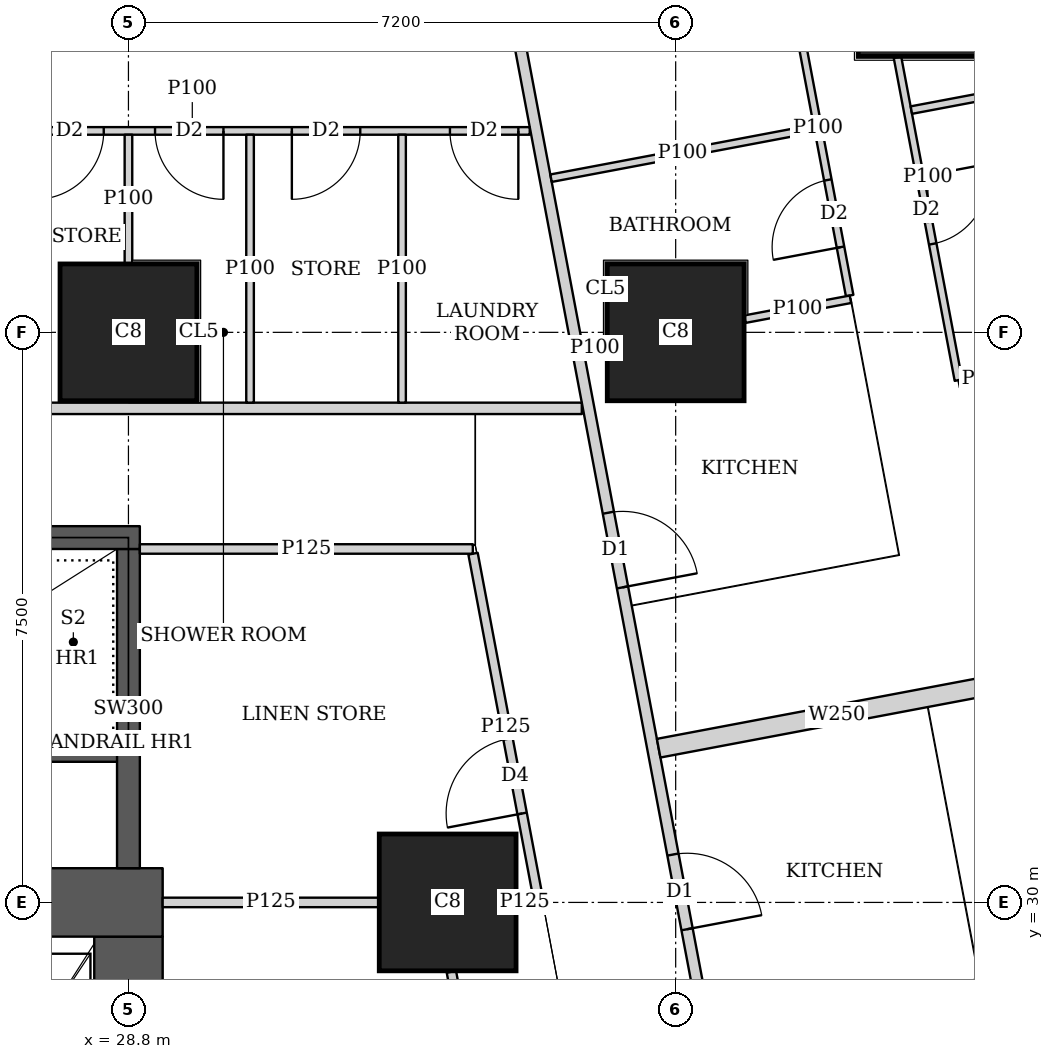
"""IFC4 building model, lengths in metres.
Left out: names, types, materials, properties, quantities, classifications, styles, units other than length and angle.
Written with IfcOpenShell. Run it as: python <this file> out.ifc"""

import sys

from ifc_helpers import new_model, si_unit, direction, frame, frame_2d, origin, origin_2d, place, context, subcontext, project, spatial, rectangle, extrude, element, fill, save


model = new_model("IFC4")
c1 = context("Model", 3, precision=1e-05, world=origin(), true_north=direction((0.0, 1.0)))
c2 = subcontext(c1, "Body", "Model", "MODEL_VIEW")
j1 = project(units=[si_unit("LENGTHUNIT", "METRE"), si_unit("PLANEANGLEUNIT", "RADIAN")], contexts=[c1])
p1 = place(None, origin())
s1 = spatial("IfcSite", under=j1, at=p1, CompositionType="ELEMENT")
p2 = place(p1, origin())
s2 = spatial("IfcBuilding", under=s1, at=p2, CompositionType="ELEMENT")
p3 = place(p2, frame((0.0, 0.0, 23.75)))
s3 = spatial("IfcBuildingStorey", under=s2, at=p3, CompositionType="ELEMENT", Elevation=23.75)
for number, where, z_axis, x_axis in (
    (1, (33.0, 30.0, 0.0), (0.0, 0.0, 1.0), (1.0, 0.0, 0.0)),
    (2, (28.8, 37.5, 0.0), (0.0, 0.0, 1.0), (1.0, 0.0, 0.0)),
    (3, (36.0, 37.5, 0.0), (0.0, 0.0, 1.0), (1.0, 0.0, 0.0)),
):
    element("IfcColumn", number, at=place(p3, frame(where, z_axis=z_axis, x_axis=x_axis)), inside=s3, PredefinedType="COLUMN", context=c2, shape_type="SweptSolid", body=[
        extrude(rectangle(XDim=1.8, YDim=1.8, at=origin_2d()), origin(), (0.0, 0.0, 1.0), 3.75),
    ])
p4 = place(p3, frame((40.102, 42.83, 0.0), z_axis=(0.0, 0.0, 1.0), x_axis=(1.0, 0.0, 0.0)))
e4 = element("IfcColumn", 4, at=p4, inside=s3, PredefinedType="COLUMN", context=c2, shape_type="SweptSolid", body=[
    extrude(rectangle(XDim=3.4, YDim=3.4, at=origin_2d()), origin(), (0.0, 0.0, 1.0), 3.75),
])
p5 = place(p3, frame((13.95, 30.0, 0.0), z_axis=(0.0, 0.0, 1.0), x_axis=(1.0, 0.0, 0.0)))
e5 = element("IfcWall", 5, at=p5, inside=s3, PredefinedType="SHEAR", context=c2, shape_type="SweptSolid", body=[
    extrude(rectangle(XDim=15.3, YDim=0.9, at=frame_2d((7.65, 0.0))), origin(), (0.0, 0.0, 1.0), 3.75),
])
p6 = place(p5, frame((4.45, 0.0, 0.0)))
e6 = element("IfcOpeningElement", 6, at=p6, cuts=e5, PredefinedType="OPENING", context=c2, shape_type="SweptSolid", body=[
    extrude(rectangle(XDim=1.8, YDim=2.1, at=frame_2d((0.9, 1.05))), frame((0.0, 0.46, 0.0), z_axis=(0.0, -1.0, 0.0), x_axis=(1.0, 0.0, 0.0)), (0.0, 0.0, 1.0), 0.92),
])
p7 = place(p5, frame((10.7, 0.0, 0.0)))
e7 = element("IfcOpeningElement", 7, at=p7, cuts=e5, PredefinedType="OPENING", context=c2, shape_type="SweptSolid", body=[
    extrude(rectangle(XDim=1.1, YDim=2.1, at=frame_2d((0.55, 1.05))), frame((0.0, 0.46, 0.0), z_axis=(0.0, -1.0, 0.0), x_axis=(1.0, 0.0, 0.0)), (0.0, 0.0, 1.0), 0.92),
])
p8 = place(p3, frame((28.8, 15.45, 0.0), z_axis=(0.0, 0.0, 1.0), x_axis=(0.0, 1.0, 0.0)))
e8 = element("IfcWall", 8, at=p8, inside=s3, PredefinedType="SHEAR", context=c2, shape_type="SweptSolid", body=[
    extrude(rectangle(XDim=14.1, YDim=0.9, at=frame_2d((7.05, 0.0))), origin(), (0.0, 0.0, 1.0), 3.75),
])
p9 = place(p3, frame((21.45, 34.8, 0.0), z_axis=(0.0, 0.0, 1.0), x_axis=(1.0, 0.0, 0.0)))
e9 = element("IfcWall", 9, at=p9, inside=s3, PredefinedType="SHEAR", context=c2, shape_type="SweptSolid", body=[
    extrude(rectangle(XDim=7.5, YDim=0.3, at=frame_2d((3.75, 0.0))), origin(), (0.0, 0.0, 1.0), 3.75),
])
p10 = place(p9, frame((0.5, 0.0, 0.0)))
e10 = element("IfcOpeningElement", 10, at=p10, cuts=e9, PredefinedType="OPENING", context=c2, shape_type="SweptSolid", body=[
    extrude(rectangle(XDim=1.1, YDim=2.1, at=frame_2d((0.55, 1.05))), frame((0.0, 0.16, 0.0), z_axis=(0.0, -1.0, 0.0), x_axis=(1.0, 0.0, 0.0)), (0.0, 0.0, 1.0), 0.32),
])
p11 = place(p3, frame((28.8, 30.45, 0.0), z_axis=(0.0, 0.0, 1.0), x_axis=(0.0, 1.0, 0.0)))
e11 = element("IfcWall", 11, at=p11, inside=s3, PredefinedType="SHEAR", context=c2, shape_type="SweptSolid", body=[
    extrude(rectangle(XDim=4.2, YDim=0.3, at=frame_2d((2.1, 0.0))), origin(), (0.0, 0.0, 1.0), 3.75),
])
p12 = place(p3, frame((8.35, 36.5, 0.0), z_axis=(0.0, 0.0, 1.0), x_axis=(1.0, 0.0, 0.0)))
e12 = element("IfcWall", 12, at=p12, inside=s3, PredefinedType="SOLIDWALL", context=c2, shape_type="SweptSolid", body=[
    extrude(rectangle(XDim=26.415, YDim=0.15, at=frame_2d((13.208, 0.0))), origin(), (0.0, 0.0, 1.0), 3.5),
])
p13 = place(p12, frame((3.383, 0.0, 0.0)))
e13 = element("IfcOpeningElement", 13, at=p13, cuts=e12, PredefinedType="OPENING", context=c2, shape_type="SweptSolid", body=[
    extrude(rectangle(XDim=1.0, YDim=2.1, at=frame_2d((0.5, 1.05))), frame((0.0, 0.085, 0.0), z_axis=(0.0, -1.0, 0.0), x_axis=(1.0, 0.0, 0.0)), (0.0, 0.0, 1.0), 0.17),
])
p14 = place(p12, frame((7.65, 0.0, 0.0)))
e14 = element("IfcOpeningElement", 14, at=p14, cuts=e12, PredefinedType="OPENING", context=c2, shape_type="SweptSolid", body=[
    extrude(rectangle(XDim=1.0, YDim=2.1, at=frame_2d((0.5, 1.05))), frame((0.0, 0.085, 0.0), z_axis=(0.0, -1.0, 0.0), x_axis=(1.0, 0.0, 0.0)), (0.0, 0.0, 1.0), 0.17),
])
p15 = place(p12, frame((14.857, 0.0, 0.0)))
e15 = element("IfcOpeningElement", 15, at=p15, cuts=e12, PredefinedType="OPENING", context=c2, shape_type="SweptSolid", body=[
    extrude(rectangle(XDim=1.0, YDim=2.1, at=frame_2d((0.5, 1.05))), frame((0.0, 0.085, 0.0), z_axis=(0.0, -1.0, 0.0), x_axis=(1.0, 0.0, 0.0)), (0.0, 0.0, 1.0), 0.17),
])
p16 = place(p3, frame((33.755, 42.325, 0.0), z_axis=(0.0, 0.0, 1.0), x_axis=(0.185611461091, -0.982623216453, 0.0)))
e16 = element("IfcWall", 16, at=p16, inside=s3, PredefinedType="SOLIDWALL", context=c2, shape_type="SweptSolid", body=[
    extrude(rectangle(XDim=40.241, YDim=0.15, at=frame_2d((20.121, 0.0))), origin(), (0.0, 0.0, 1.0), 2.5),
])
p17 = place(p16, frame((7.325, 0.0, 0.0)))
e17 = element("IfcOpeningElement", 17, at=p17, cuts=e16, PredefinedType="OPENING", context=c2, shape_type="SweptSolid", body=[
    extrude(rectangle(XDim=1.0, YDim=2.1, at=frame_2d((0.5, 1.05))), frame((0.0, 0.085, 0.0), z_axis=(0.0, -1.0, 0.0), x_axis=(1.0, 0.0, 0.0)), (0.0, 0.0, 1.0), 0.17),
])
p18 = place(p16, frame((11.902, 0.0, 0.0)))
e18 = element("IfcOpeningElement", 18, at=p18, cuts=e16, PredefinedType="OPENING", context=c2, shape_type="SweptSolid", body=[
    extrude(rectangle(XDim=1.0, YDim=2.1, at=frame_2d((0.5, 1.05))), frame((0.0, 0.085, 0.0), z_axis=(0.0, -1.0, 0.0), x_axis=(1.0, 0.0, 0.0)), (0.0, 0.0, 1.0), 0.17),
])
p19 = place(p16, frame((25.718, 0.0, 0.0)))
e19 = element("IfcOpeningElement", 19, at=p19, cuts=e16, PredefinedType="OPENING", context=c2, shape_type="SweptSolid", body=[
    extrude(rectangle(XDim=1.0, YDim=2.1, at=frame_2d((0.5, 1.05))), frame((0.0, 0.085, 0.0), z_axis=(0.0, -1.0, 0.0), x_axis=(1.0, 0.0, 0.0)), (0.0, 0.0, 1.0), 0.17),
])
p20 = place(p16, frame((31.788, 0.0, 0.0)))
e20 = element("IfcOpeningElement", 20, at=p20, cuts=e16, PredefinedType="OPENING", context=c2, shape_type="SweptSolid", body=[
    extrude(rectangle(XDim=1.0, YDim=2.1, at=frame_2d((0.5, 1.05))), frame((0.0, 0.085, 0.0), z_axis=(0.0, -1.0, 0.0), x_axis=(1.0, 0.0, 0.0)), (0.0, 0.0, 1.0), 0.17),
])
p21 = place(p3, frame((38.918, 41.12, 0.0), z_axis=(0.0, 0.0, 1.0), x_axis=(0.185474723155, -0.982649035552, 0.0)))
e21 = element("IfcWall", 21, at=p21, inside=s3, PredefinedType="PARTITIONING", context=c2, shape_type="SweptSolid", body=[
    extrude(rectangle(XDim=4.324, YDim=0.1, at=frame_2d((2.162, 0.0))), origin(), (0.0, 0.0, 1.0), 3.5),
])
p22 = place(p21, frame((1.6, 0.0, 0.0)))
e22 = element("IfcOpeningElement", 22, at=p22, cuts=e21, PredefinedType="OPENING", context=c2, shape_type="SweptSolid", body=[
    extrude(rectangle(XDim=0.9, YDim=2.1, at=frame_2d((0.45, 1.05))), frame((0.0, 0.06, 0.0), z_axis=(0.0, -1.0, 0.0), x_axis=(1.0, 0.0, 0.0)), (0.0, 0.0, 1.0), 0.12),
])
p23 = place(p3, frame((37.457, 42.39, 0.0), z_axis=(0.0, 0.0, 1.0), x_axis=(0.185560627322, -0.982632817276, 0.0)))
e23 = element("IfcWall", 23, at=p23, inside=s3, PredefinedType="PARTITIONING", context=c2, shape_type="SweptSolid", body=[
    extrude(rectangle(XDim=4.484, YDim=0.1, at=frame_2d((2.242, 0.0))), origin(), (0.0, 0.0, 1.0), 3.5),
])
p24 = place(p23, frame((2.936, 0.0, 0.0)))
e24 = element("IfcOpeningElement", 24, at=p24, cuts=e23, PredefinedType="OPENING", context=c2, shape_type="SweptSolid", body=[
    extrude(rectangle(XDim=0.9, YDim=2.1, at=frame_2d((0.45, 1.05))), frame((0.0, 0.06, 0.0), z_axis=(0.0, -1.0, 0.0), x_axis=(1.0, 0.0, 0.0)), (0.0, 0.0, 1.0), 0.12),
])
p25 = place(p3, frame((43.277, 41.212, 0.0), z_axis=(0.0, 0.0, 1.0), x_axis=(-0.982665405803, -0.185387972203, 0.0)))
e25 = element("IfcWall", 25, at=p25, inside=s3, PredefinedType="PARTITIONING", context=c2, shape_type="SweptSolid", body=[
    extrude(rectangle(XDim=4.25, YDim=0.1, at=frame_2d((2.125, 0.0))), origin(), (0.0, 0.0, 1.0), 2.1),
])
p26 = place(p3, frame((40.454, 36.959, 0.0), z_axis=(0.0, 0.0, 1.0), x_axis=(-0.982578421631, -0.185848447247, 0.0)))
e26 = element("IfcWall", 26, at=p26, inside=s3, PredefinedType="PARTITIONING", context=c2, shape_type="SweptSolid", body=[
    extrude(rectangle(XDim=0.737, YDim=0.1, at=frame_2d((0.369, 0.0))), origin(), (0.0, 0.0, 1.0), 3.5),
])
p27 = place(p3, frame((37.823, 40.182, 0.0), z_axis=(0.0, 0.0, 1.0), x_axis=(-0.98263926043, -0.185526504472, 0.0)))
e27 = element("IfcWall", 27, at=p27, inside=s3, PredefinedType="PARTITIONING", context=c2, shape_type="SweptSolid", body=[
    extrude(rectangle(XDim=3.524, YDim=0.1, at=frame_2d((1.762, 0.0))), origin(), (0.0, 0.0, 1.0), 3.5),
])
p28 = place(p3, frame((38.299, 37.935, 0.0), z_axis=(0.0, 0.0, 1.0), x_axis=(-0.982680053146, -0.185310315822, 0.0)))
e28 = element("IfcWall", 28, at=p28, inside=s3, PredefinedType="PARTITIONING", context=c2, shape_type="SweptSolid", body=[
    extrude(rectangle(XDim=1.414, YDim=0.1, at=frame_2d((0.707, 0.0))), origin(), (0.0, 0.0, 1.0), 3.5),
])
p29 = place(p3, frame((35.09, 37.328, 0.0), z_axis=(0.0, 0.0, 1.0), x_axis=(-0.982961380226, -0.183812200315, 0.0)))
e29 = element("IfcWall", 29, at=p29, inside=s3, PredefinedType="PARTITIONING", context=c2, shape_type="SweptSolid", body=[
    extrude(rectangle(XDim=0.31, YDim=0.1, at=frame_2d((0.155, 0.0))), origin(), (0.0, 0.0, 1.0), 3.5),
])
p30 = place(p3, frame((40.468, 32.915, 0.0), z_axis=(0.0, 0.0, 1.0), x_axis=(-0.982635807605, -0.185544791394, 0.0)))
e30 = element("IfcWall", 30, at=p30, inside=s3, PredefinedType="SOLIDWALL", context=c2, shape_type="SweptSolid", body=[
    extrude(rectangle(XDim=4.775, YDim=0.25, at=frame_2d((2.388, 0.0))), origin(), (0.0, 0.0, 1.0), 3.5),
])
p31 = place(p3, frame((25.2, 40.15, 0.0), z_axis=(0.0, 0.0, 1.0), x_axis=(1.0, 0.0, 0.0)))
e31 = element("IfcWall", 31, at=p31, inside=s3, PredefinedType="PARTITIONING", context=c2, shape_type="SweptSolid", body=[
    extrude(rectangle(XDim=8.88, YDim=0.1, at=frame_2d((4.44, 0.0))), origin(), (0.0, 0.0, 1.0), 3.5),
])
p32 = place(p31, frame((0.575, 0.0, 0.0)))
e32 = element("IfcOpeningElement", 32, at=p32, cuts=e31, PredefinedType="OPENING", context=c2, shape_type="SweptSolid", body=[
    extrude(rectangle(XDim=0.9, YDim=2.1, at=frame_2d((0.45, 1.05))), frame((0.0, 0.06, 0.0), z_axis=(0.0, -1.0, 0.0), x_axis=(1.0, 0.0, 0.0)), (0.0, 0.0, 1.0), 0.12),
])
p33 = place(p31, frame((3.95, 0.0, 0.0)))
e33 = element("IfcOpeningElement", 33, at=p33, cuts=e31, PredefinedType="OPENING", context=c2, shape_type="SweptSolid", body=[
    extrude(rectangle(XDim=0.9, YDim=2.1, at=frame_2d((0.45, 1.05))), frame((0.0, 0.06, 0.0), z_axis=(0.0, -1.0, 0.0), x_axis=(1.0, 0.0, 0.0)), (0.0, 0.0, 1.0), 0.12),
])
p34 = place(p31, frame((7.83, 0.0, 0.0)))
e34 = element("IfcOpeningElement", 34, at=p34, cuts=e31, PredefinedType="OPENING", context=c2, shape_type="SweptSolid", body=[
    extrude(rectangle(XDim=0.9, YDim=2.1, at=frame_2d((0.45, 1.05))), frame((0.0, 0.06, 0.0), z_axis=(0.0, -1.0, 0.0), x_axis=(1.0, 0.0, 0.0)), (0.0, 0.0, 1.0), 0.12),
])
p35 = place(p31, frame((2.375, 0.0, 0.0)))
e35 = element("IfcOpeningElement", 35, at=p35, cuts=e31, PredefinedType="OPENING", context=c2, shape_type="SweptSolid", body=[
    extrude(rectangle(XDim=0.9, YDim=2.1, at=frame_2d((0.45, 1.05))), frame((0.0, 0.06, 0.0), z_axis=(0.0, -1.0, 0.0), x_axis=(1.0, 0.0, 0.0)), (0.0, 0.0, 1.0), 0.12),
])
p36 = place(p31, frame((5.75, 0.0, 0.0)))
e36 = element("IfcOpeningElement", 36, at=p36, cuts=e31, PredefinedType="OPENING", context=c2, shape_type="SweptSolid", body=[
    extrude(rectangle(XDim=0.9, YDim=2.1, at=frame_2d((0.45, 1.05))), frame((0.0, 0.06, 0.0), z_axis=(0.0, -1.0, 0.0), x_axis=(1.0, 0.0, 0.0)), (0.0, 0.0, 1.0), 0.12),
])
p37 = place(p3, frame((28.8, 38.401, 0.0), z_axis=(0.0, 0.0, 1.0), x_axis=(0.0, 1.0, 0.0)))
e37 = element("IfcWall", 37, at=p37, inside=s3, PredefinedType="PARTITIONING", context=c2, shape_type="SweptSolid", body=[
    extrude(rectangle(XDim=1.699, YDim=0.1, at=frame_2d((0.85, 0.0))), origin(), (0.0, 0.0, 1.0), 3.5),
])
for number, where, z_axis, x_axis in (
    (38, (32.4, 36.575, 0.0), (0.0, 0.0, 1.0), (0.0, 1.0, 0.0)),
    (39, (30.4, 36.575, 0.0), (0.0, 0.0, 1.0), (0.0, 1.0, 0.0)),
):
    element("IfcWall", number, at=place(p3, frame(where, z_axis=z_axis, x_axis=x_axis)), inside=s3, PredefinedType="PARTITIONING", context=c2, shape_type="SweptSolid", body=[
        extrude(rectangle(XDim=3.525, YDim=0.1, at=frame_2d((1.763, 0.0))), origin(), (0.0, 0.0, 1.0), 3.5),
    ])
p38 = place(p3, frame((28.95, 34.65, 0.0), z_axis=(0.0, 0.0, 1.0), x_axis=(1.0, 0.0, 0.0)))
e40 = element("IfcWall", 40, at=p38, inside=s3, PredefinedType="PARTITIONING", context=c2, shape_type="SweptSolid", body=[
    extrude(rectangle(XDim=4.381, YDim=0.125, at=frame_2d((2.19, 0.0))), origin(), (0.0, 0.0, 1.0), 3.5),
])
p39 = place(p3, frame((34.193, 30.04, 0.0), z_axis=(0.0, 0.0, 1.0), x_axis=(-0.185626015863, 0.982620467034, 0.0)))
e41 = element("IfcWall", 41, at=p39, inside=s3, PredefinedType="PARTITIONING", context=c2, shape_type="SweptSolid", body=[
    extrude(rectangle(XDim=4.628, YDim=0.125, at=frame_2d((2.314, 0.0))), origin(), (0.0, 0.0, 1.0), 2.5),
])
p40 = place(p39, frame((1.15, 0.0, 0.0)))
e42 = element("IfcOpeningElement", 42, at=p40, cuts=e41, PredefinedType="OPENING", context=c2, shape_type="SweptSolid", body=[
    extrude(rectangle(XDim=1.0, YDim=2.1, at=frame_2d((0.5, 1.05))), frame((0.0, 0.073, 0.0), z_axis=(0.0, -1.0, 0.0), x_axis=(1.0, 0.0, 0.0)), (0.0, 0.0, 1.0), 0.145),
])
p41 = place(p3, frame((34.28, 22.574, 0.0), z_axis=(0.0, 0.0, 1.0), x_axis=(-0.185713862218, 0.982603867986, 0.0)))
e43 = element("IfcWall", 43, at=p41, inside=s3, PredefinedType="PARTITIONING", context=c2, shape_type="SweptSolid", body=[
    extrude(rectangle(XDim=6.628, YDim=0.125, at=frame_2d((3.314, 0.0))), origin(), (0.0, 0.0, 1.0), 2.5),
])
p42 = place(p41, frame((3.241, 0.0, 0.0)))
e44 = element("IfcOpeningElement", 44, at=p42, cuts=e43, PredefinedType="OPENING", context=c2, shape_type="SweptSolid", body=[
    extrude(rectangle(XDim=1.0, YDim=2.1, at=frame_2d((0.5, 1.05))), frame((0.0, 0.073, 0.0), z_axis=(0.0, -1.0, 0.0), x_axis=(1.0, 0.0, 0.0)), (0.0, 0.0, 1.0), 0.145),
])
p43 = place(p3, frame((29.25, 30.0, 0.0), z_axis=(0.0, 0.0, 1.0), x_axis=(1.0, 0.0, 0.0)))
e45 = element("IfcWall", 45, at=p43, inside=s3, PredefinedType="PARTITIONING", context=c2, shape_type="SweptSolid", body=[
    extrude(rectangle(XDim=2.849, YDim=0.125, at=frame_2d((1.425, 0.0))), origin(), (0.0, 0.0, 1.0), 3.5),
])
p44 = place(p3, frame((33.901, 30.0, 0.0), z_axis=(0.0, 0.0, 1.0), x_axis=(1.0, 0.0, 0.0)))
e46 = element("IfcWall", 46, at=p44, inside=s3, PredefinedType="PARTITIONING", context=c2, shape_type="SweptSolid", body=[
    extrude(rectangle(XDim=0.224, YDim=0.125, at=frame_2d((0.112, 0.0))), origin(), (0.0, 0.0, 1.0), 2.5),
])
p45 = place(p3, frame((23.0, 31.95, 0.0), z_axis=(0.0, 0.0, 1.0), x_axis=(1.0, 0.0, 0.0)))
e47 = element("IfcWall", 47, at=p45, inside=s3, PredefinedType="SHEAR", context=c2, shape_type="SweptSolid", body=[
    extrude(rectangle(XDim=5.8, YDim=0.2, at=frame_2d((2.9, 0.0))), origin(), (0.0, 0.0, 1.0), 3.75),
])
p46 = place(p22, origin())
e48 = element("IfcDoor", 48, at=p46, inside=s3, OperationType="SINGLE_SWING_LEFT", PredefinedType="DOOR", context=c2, shape_type="SweptSolid", body=[
    extrude(rectangle(XDim=0.9, YDim=2.1, at=frame_2d((0.45, 1.05))), frame((0.0, 0.025, 0.0), z_axis=(0.0, -1.0, 0.0), x_axis=(1.0, 0.0, 0.0)), (0.0, 0.0, 1.0), 0.05),
])
fill(e22, e48)
p47 = place(p24, origin())
e49 = element("IfcDoor", 49, at=p47, inside=s3, OperationType="SINGLE_SWING_LEFT", PredefinedType="DOOR", context=c2, shape_type="SweptSolid", body=[
    extrude(rectangle(XDim=0.9, YDim=2.1, at=frame_2d((0.45, 1.05))), frame((0.0, 0.025, 0.0), z_axis=(0.0, -1.0, 0.0), x_axis=(1.0, 0.0, 0.0)), (0.0, 0.0, 1.0), 0.05),
])
fill(e24, e49)
p48 = place(p17, origin())
e50 = element("IfcDoor", 50, at=p48, inside=s3, OperationType="SINGLE_SWING_RIGHT", PredefinedType="DOOR", context=c2, shape_type="SweptSolid", body=[
    extrude(rectangle(XDim=1.0, YDim=2.1, at=frame_2d((0.5, 1.05))), frame((0.0, 0.025, 0.0), z_axis=(0.0, -1.0, 0.0), x_axis=(1.0, 0.0, 0.0)), (0.0, 0.0, 1.0), 0.05),
])
fill(e17, e50)
p49 = place(p18, origin())
e51 = element("IfcDoor", 51, at=p49, inside=s3, OperationType="SINGLE_SWING_RIGHT", PredefinedType="DOOR", context=c2, shape_type="SweptSolid", body=[
    extrude(rectangle(XDim=1.0, YDim=2.1, at=frame_2d((0.5, 1.05))), frame((0.0, 0.025, 0.0), z_axis=(0.0, -1.0, 0.0), x_axis=(1.0, 0.0, 0.0)), (0.0, 0.0, 1.0), 0.05),
])
fill(e18, e51)
p50 = place(p33, origin())
e52 = element("IfcDoor", 52, at=p50, inside=s3, OperationType="SINGLE_SWING_LEFT", PredefinedType="DOOR", context=c2, shape_type="SweptSolid", body=[
    extrude(rectangle(XDim=0.9, YDim=2.1, at=frame_2d((0.45, 1.05))), frame((0.0, 0.025, 0.0), z_axis=(0.0, -1.0, 0.0), x_axis=(1.0, 0.0, 0.0)), (0.0, 0.0, 1.0), 0.05),
])
fill(e33, e52)
p51 = place(p34, origin())
e53 = element("IfcDoor", 53, at=p51, inside=s3, OperationType="SINGLE_SWING_LEFT", PredefinedType="DOOR", context=c2, shape_type="SweptSolid", body=[
    extrude(rectangle(XDim=0.9, YDim=2.1, at=frame_2d((0.45, 1.05))), frame((0.0, 0.025, 0.0), z_axis=(0.0, -1.0, 0.0), x_axis=(1.0, 0.0, 0.0)), (0.0, 0.0, 1.0), 0.05),
])
fill(e34, e53)
p52 = place(p35, origin())
e54 = element("IfcDoor", 54, at=p52, inside=s3, OperationType="SINGLE_SWING_RIGHT", PredefinedType="DOOR", context=c2, shape_type="SweptSolid", body=[
    extrude(rectangle(XDim=0.9, YDim=2.1, at=frame_2d((0.45, 1.05))), frame((0.0, 0.025, 0.0), z_axis=(0.0, -1.0, 0.0), x_axis=(1.0, 0.0, 0.0)), (0.0, 0.0, 1.0), 0.05),
])
fill(e35, e54)
p53 = place(p36, origin())
e55 = element("IfcDoor", 55, at=p53, inside=s3, OperationType="SINGLE_SWING_RIGHT", PredefinedType="DOOR", context=c2, shape_type="SweptSolid", body=[
    extrude(rectangle(XDim=0.9, YDim=2.1, at=frame_2d((0.45, 1.05))), frame((0.0, 0.025, 0.0), z_axis=(0.0, -1.0, 0.0), x_axis=(1.0, 0.0, 0.0)), (0.0, 0.0, 1.0), 0.05),
])
fill(e36, e55)
p54 = place(p40, origin())
e56 = element("IfcDoor", 56, at=p54, inside=s3, OperationType="SINGLE_SWING_LEFT", PredefinedType="DOOR", context=c2, shape_type="SweptSolid", body=[
    extrude(rectangle(XDim=1.0, YDim=2.1, at=frame_2d((0.5, 1.05))), frame((0.0, 0.025, 0.0), z_axis=(0.0, -1.0, 0.0), x_axis=(1.0, 0.0, 0.0)), (0.0, 0.0, 1.0), 0.05),
])
fill(e42, e56)
save(model, sys.argv[1])
